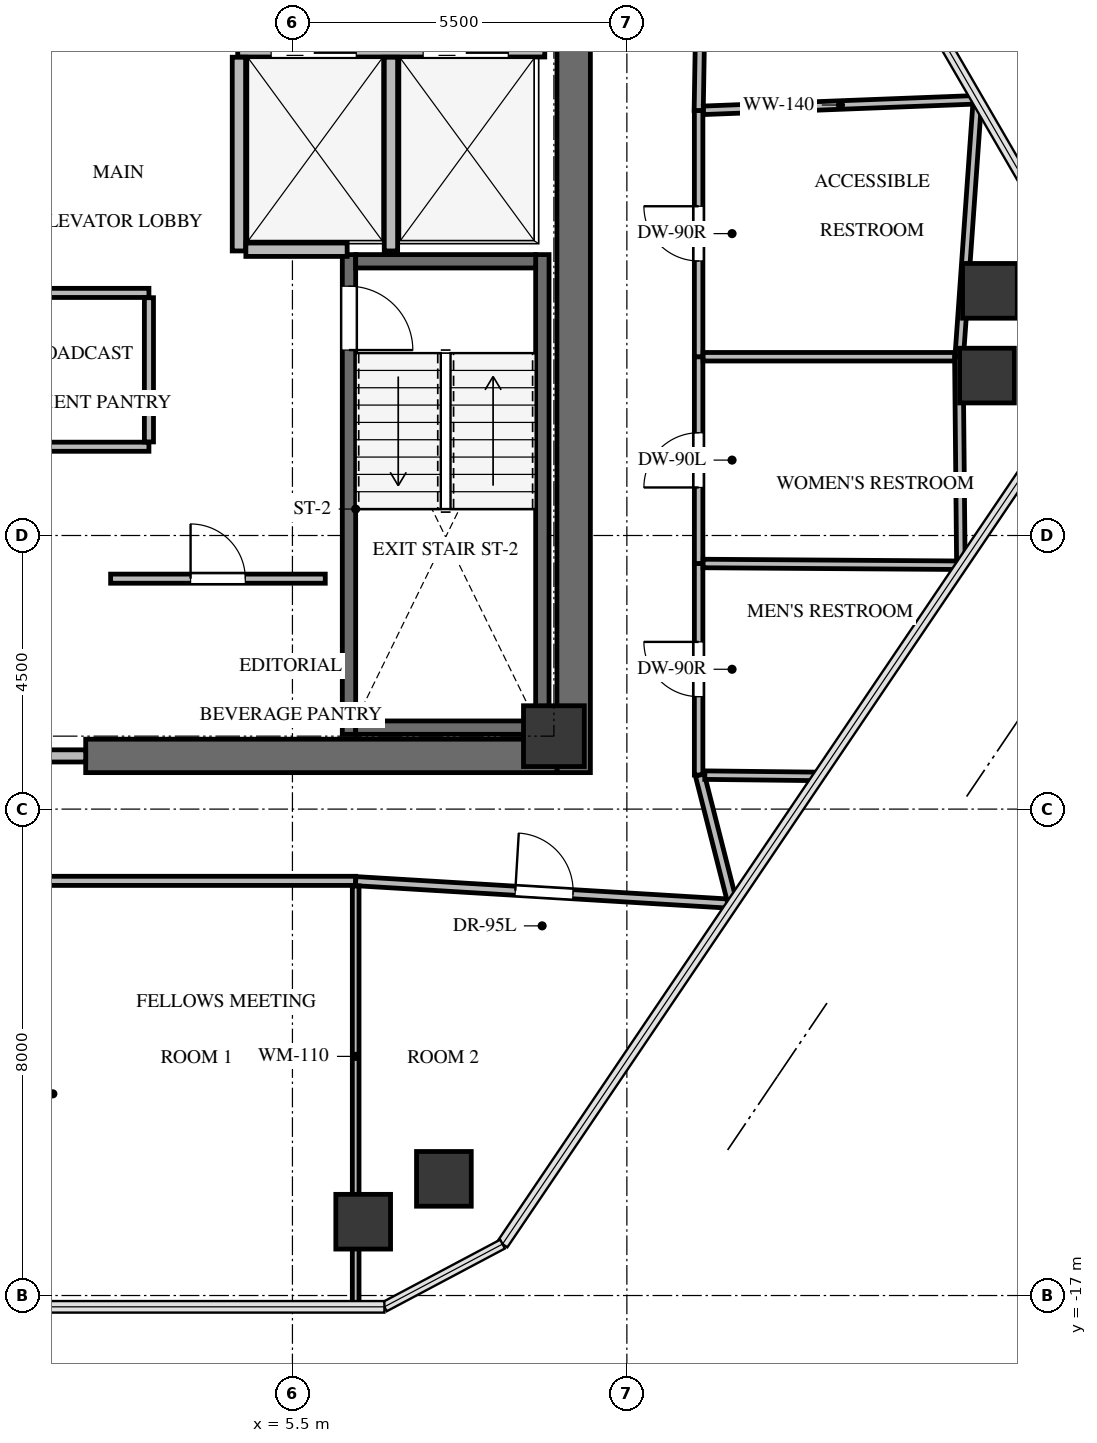
"""IFC4 building model, lengths in metres.
Left out: names, types, materials, properties, quantities, classifications, styles, units other than length and angle.
Written with IfcOpenShell. Run it as: python <this file> out.ifc"""

import sys

from ifc_helpers import new_model, si_unit, direction, frame, frame_2d, origin, origin_2d, place, context, subcontext, project, spatial, rectangle, extrude, source, transform, mapped, element, fill, save


model = new_model("IFC4")
c1 = context("Model", 3, precision=1e-05, world=origin(), true_north=direction((0.0, 1.0)))
c2 = subcontext(c1, "Body", "Model", "MODEL_VIEW")
j1 = project(units=[si_unit("LENGTHUNIT", "METRE"), si_unit("PLANEANGLEUNIT", "RADIAN")], contexts=[c1])
p1 = place(None, origin())
s1 = spatial("IfcSite", under=j1, at=p1, CompositionType="ELEMENT")
p2 = place(p1, origin())
s2 = spatial("IfcBuilding", under=s1, at=p2, CompositionType="ELEMENT")
p3 = place(p2, frame((0.0, 0.0, 251.3)))
s3 = spatial("IfcBuildingStorey", under=s2, at=p3, CompositionType="ELEMENT", Elevation=251.3)
p4 = place(p3, frame((10.125, -8.4, 0.0), z_axis=(0.0, 0.0, 1.0), x_axis=(0.0, 1.0, 0.0)))
e1 = element("IfcWall", 1, at=p4, inside=s3, PredefinedType="SHEAR", context=c2, shape_type="SweptSolid", body=[
    extrude(rectangle(XDim=16.8, YDim=0.55, at=frame_2d((8.4, 0.0))), origin(), (0.0, 0.0, 1.0), 3.4),
])
p5 = place(p3, frame((2.1, -8.125, 0.0), z_axis=(0.0, 0.0, 1.0), x_axis=(1.0, 0.0, 0.0)))
e2 = element("IfcWall", 2, at=p5, inside=s3, PredefinedType="SHEAR", context=c2, shape_type="SweptSolid", body=[
    extrude(rectangle(XDim=7.75, YDim=0.55, at=frame_2d((3.875, 0.0))), origin(), (0.0, 0.0, 1.0), 3.4),
])
p6 = place(p3, frame((9.61, -7.77, -0.24), z_axis=(0.0, 0.0, 1.0), x_axis=(0.0, 1.0, 0.0)))
e3 = element("IfcWall", 3, at=p6, inside=s3, PredefinedType="SHEAR", context=c2, shape_type="SweptSolid", body=[
    extrude(rectangle(XDim=7.89, YDim=0.22, at=frame_2d((3.945, 0.0))), origin(), (0.0, 0.0, 1.0), 3.4),
])
p7 = place(p3, frame((6.43, 0.12, -0.24), z_axis=(0.0, 0.0, 1.0), x_axis=(0.0, -1.0, 0.0)))
e4 = element("IfcWall", 4, at=p7, inside=s3, PredefinedType="SHEAR", context=c2, shape_type="SweptSolid", body=[
    extrude(rectangle(XDim=7.89, YDim=0.22, at=frame_2d((3.945, 0.0))), origin(), (0.0, 0.0, 1.0), 3.4),
])
p8 = place(p7, frame((0.52, 0.0, 0.0)))
e5 = element("IfcOpeningElement", 5, at=p8, cuts=e4, PredefinedType="OPENING", context=c2, shape_type="SweptSolid", body=[
    extrude(rectangle(XDim=1.05, YDim=2.15, at=frame_2d((0.525, 1.075))), frame((0.0, 0.12, 0.0), z_axis=(0.0, -1.0, 0.0), x_axis=(1.0, 0.0, 0.0)), (0.0, 0.0, 1.0), 0.24),
])
for number, where, z_axis, x_axis in (
    (6, (6.54, -7.66, -0.24), (0.0, 0.0, 1.0), (1.0, 0.0, 0.0)),
    (7, (9.5, 0.01, -0.24), (0.0, 0.0, 1.0), (-1.0, 0.0, 0.0)),
):
    element("IfcWall", number, at=place(p3, frame(where, z_axis=z_axis, x_axis=x_axis)), inside=s3, PredefinedType="SHEAR", context=c2, shape_type="SweptSolid", body=[
        extrude(rectangle(XDim=2.96, YDim=0.22, at=frame_2d((1.48, 0.0))), origin(), (0.0, 0.0, 1.0), 3.4),
    ])
m1 = source(origin(), c2, "Body", "SweptSolid", [
    extrude(rectangle(XDim=1.0, YDim=1.0, at=origin_2d()), origin(), (0.0, 0.0, 1.0), 3.4),
])
p9 = place(p3, frame((9.8, -7.8, -0.24), z_axis=(0.0, 0.0, 1.0), x_axis=(1.0, 0.0, 0.0)))
e8 = element("IfcColumn", 8, at=p9, inside=s3, PredefinedType="COLUMN", context=c2, shape_type="MappedRepresentation", body=[
    mapped(m1, transform((0.0, 0.0, 0.0), x_axis=(1.0, 0.0, 0.0), y_axis=(0.0, 1.0, 0.0), z_axis=(0.0, 0.0, 1.0), scale=1.0)),
])
m2 = source(origin(), c2, "Body", "SweptSolid", [
    extrude(rectangle(XDim=0.9, YDim=0.9, at=origin_2d()), origin(), (0.0, 0.0, 1.0), 3.4),
])
for number, where, z_axis, x_axis in (
    (9, (16.97, -0.476, -0.24), (0.0, 0.0, 1.0), (1.0, 0.0, 0.0)),
    (10, (16.922, -1.87, -0.24), (0.0, 0.0, 1.0), (1.0, 0.0, 0.0)),
    (11, (7.991, -15.081, -0.24), (0.0, 0.0, 1.0), (1.0, 0.0, 0.0)),
    (12, (6.664, -15.786, -0.24), (0.0, 0.0, 1.0), (1.0, 0.0, 0.0)),
):
    element("IfcColumn", number, at=place(p3, frame(where, z_axis=z_axis, x_axis=x_axis)), inside=s3, PredefinedType="COLUMN", context=c2, shape_type="MappedRepresentation", body=[
        mapped(m2, transform((0.0, 0.0, 0.0), x_axis=(1.0, 0.0, 0.0), y_axis=(0.0, 1.0, 0.0), z_axis=(0.0, 0.0, 1.0), scale=1.0)),
    ])
p10 = place(p3, frame((-2.1, -8.125, 0.0), z_axis=(0.0, 0.0, 1.0), x_axis=(1.0, 0.0, 0.0)))
e13 = element("IfcWall", 13, at=p10, inside=s3, PredefinedType="SOLIDWALL", context=c2, shape_type="SweptSolid", body=[
    extrude(rectangle(XDim=4.2, YDim=0.2, at=frame_2d((2.1, 0.0))), origin(), (0.0, 0.0, 1.0), 3.145),
])
p11 = place(p10, frame((1.2, 0.0, 0.0)))
e14 = element("IfcOpeningElement", 14, at=p11, cuts=e13, PredefinedType="OPENING", context=c2, shape_type="SweptSolid", body=[
    extrude(rectangle(XDim=1.8, YDim=2.15, at=frame_2d((0.9, 1.075))), frame((0.0, 0.11, 0.0), z_axis=(0.0, -1.0, 0.0), x_axis=(1.0, 0.0, 0.0)), (0.0, 0.0, 1.0), 0.22),
])
p12 = place(p3, frame((4.6, 3.48, 0.0), z_axis=(0.0, 0.0, 1.0), x_axis=(1.0, 0.0, 0.0)))
e15 = element("IfcWall", 15, at=p12, inside=s3, PredefinedType="SOLIDWALL", context=c2, shape_type="SweptSolid", body=[
    extrude(rectangle(XDim=5.05, YDim=0.22, at=frame_2d((2.525, 0.0))), origin(), (0.0, 0.0, 1.0), 3.145),
])
p13 = place(p12, frame((0.55, 0.0, 0.0)))
e16 = element("IfcOpeningElement", 16, at=p13, cuts=e15, PredefinedType="OPENING", context=c2, shape_type="SweptSolid", body=[
    extrude(rectangle(XDim=1.4, YDim=2.15, at=frame_2d((0.7, 1.075))), frame((0.0, 0.12, 0.0), z_axis=(0.0, -1.0, 0.0), x_axis=(1.0, 0.0, 0.0)), (0.0, 0.0, 1.0), 0.24),
])
p14 = place(p12, frame((3.05, 0.0, 0.0)))
e17 = element("IfcOpeningElement", 17, at=p14, cuts=e15, PredefinedType="OPENING", context=c2, shape_type="SweptSolid", body=[
    extrude(rectangle(XDim=1.4, YDim=2.15, at=frame_2d((0.7, 1.075))), frame((0.0, 0.12, 0.0), z_axis=(0.0, -1.0, 0.0), x_axis=(1.0, 0.0, 0.0)), (0.0, 0.0, 1.0), 0.24),
])
for number, where, z_axis, x_axis in (
    (18, (4.62, 0.18, 0.0), (0.0, 0.0, 1.0), (0.0, 1.0, 0.0)),
    (19, (7.12, 0.18, 0.0), (0.0, 0.0, 1.0), (0.0, 1.0, 0.0)),
):
    element("IfcWall", number, at=place(p3, frame(where, z_axis=z_axis, x_axis=x_axis)), inside=s3, PredefinedType="SOLIDWALL", context=c2, shape_type="SweptSolid", body=[
        extrude(rectangle(XDim=3.186, YDim=0.22, at=frame_2d((1.593, 0.0))), origin(), (0.0, 0.0, 1.0), 3.145),
    ])
p15 = place(p3, frame((4.734, 0.2, 0.0), z_axis=(0.0, 0.0, 1.0), x_axis=(1.0, 0.0, 0.0)))
e20 = element("IfcWall", 20, at=p15, inside=s3, PredefinedType="SOLIDWALL", context=c2, shape_type="SweptSolid", body=[
    extrude(rectangle(XDim=1.666, YDim=0.22, at=frame_2d((0.833, 0.0))), origin(), (0.0, 0.0, 1.0), 3.145),
])
p16 = place(p3, frame((2.51, -5.21, 0.0), z_axis=(0.0, 0.0, 1.0), x_axis=(1.0, 0.0, 0.0)))
e21 = element("IfcWall", 21, at=p16, inside=s3, PredefinedType="PARTITIONING", context=c2, shape_type="SweptSolid", body=[
    extrude(rectangle(XDim=3.53, YDim=0.15, at=frame_2d((1.765, 0.0))), origin(), (0.0, 0.0, 1.0), 3.145),
])
p17 = place(p16, frame((1.315, 0.0, 0.0)))
e22 = element("IfcOpeningElement", 22, at=p17, cuts=e21, PredefinedType="OPENING", context=c2, shape_type="SweptSolid", body=[
    extrude(rectangle(XDim=0.9, YDim=2.05, at=frame_2d((0.45, 1.025))), frame((0.0, 0.085, 0.0), z_axis=(0.0, -1.0, 0.0), x_axis=(1.0, 0.0, 0.0)), (0.0, 0.0, 1.0), 0.17),
])
p18 = place(p3, frame((3.14, -3.04, 0.0), z_axis=(0.0, 0.0, 1.0), x_axis=(-1.0, 0.0, 0.0)))
e23 = element("IfcWall", 23, at=p18, inside=s3, PredefinedType="PARTITIONING", context=c2, shape_type="SweptSolid", body=[
    extrude(rectangle(XDim=7.48, YDim=0.15, at=frame_2d((3.74, 0.0))), origin(), (0.0, 0.0, 1.0), 3.145),
])
p19 = place(p18, frame((3.29, 0.0, 0.0)))
e24 = element("IfcOpeningElement", 24, at=p19, cuts=e23, PredefinedType="OPENING", context=c2, shape_type="SweptSolid", body=[
    extrude(rectangle(XDim=0.9, YDim=2.05, at=frame_2d((0.45, 1.025))), frame((0.0, 0.085, 0.0), z_axis=(0.0, -1.0, 0.0), x_axis=(1.0, 0.0, 0.0)), (0.0, 0.0, 1.0), 0.17),
])
p20 = place(p3, frame((-4.34, -0.51, 0.0), z_axis=(0.0, 0.0, 1.0), x_axis=(1.0, 0.0, 0.0)))
e25 = element("IfcWall", 25, at=p20, inside=s3, PredefinedType="PARTITIONING", context=c2, shape_type="SweptSolid", body=[
    extrude(rectangle(XDim=7.48, YDim=0.15, at=frame_2d((3.74, 0.0))), origin(), (0.0, 0.0, 1.0), 3.145),
])
p21 = place(p3, frame((3.14, -0.589, 0.0), z_axis=(0.0, 0.0, 1.0), x_axis=(0.0, -1.0, 0.0)))
e26 = element("IfcWall", 26, at=p21, inside=s3, PredefinedType="PARTITIONING", context=c2, shape_type="SweptSolid", body=[
    extrude(rectangle(XDim=2.372, YDim=0.15, at=frame_2d((1.186, 0.0))), origin(), (0.0, 0.0, 1.0), 3.145),
])
p22 = place(p3, frame((12.18, -8.44, 0.0), z_axis=(0.0, 0.0, 1.0), x_axis=(0.0, 1.0, 0.0)))
e27 = element("IfcWall", 27, at=p22, inside=s3, PredefinedType="PARTITIONING", context=c2, shape_type="SweptSolid", body=[
    extrude(rectangle(XDim=3.48, YDim=0.14, at=frame_2d((1.74, 0.0))), origin(), (0.0, 0.0, 1.0), 2.499),
])
p23 = place(p22, frame((1.29, 0.0, 0.0)))
e28 = element("IfcOpeningElement", 28, at=p23, cuts=e27, PredefinedType="OPENING", context=c2, shape_type="SweptSolid", body=[
    extrude(rectangle(XDim=0.9, YDim=2.05, at=frame_2d((0.45, 1.025))), frame((0.0, 0.08, 0.0), z_axis=(0.0, -1.0, 0.0), x_axis=(1.0, 0.0, 0.0)), (0.0, 0.0, 1.0), 0.16),
])
p24 = place(p3, frame((12.18, -4.96, 0.0), z_axis=(0.0, 0.0, 1.0), x_axis=(0.0, 1.0, 0.0)))
e29 = element("IfcWall", 29, at=p24, inside=s3, PredefinedType="PARTITIONING", context=c2, shape_type="SweptSolid", body=[
    extrude(rectangle(XDim=3.4, YDim=0.14, at=frame_2d((1.7, 0.0))), origin(), (0.0, 0.0, 1.0), 3.145),
])
p25 = place(p24, frame((1.25, 0.0, 0.0)))
e30 = element("IfcOpeningElement", 30, at=p25, cuts=e29, PredefinedType="OPENING", context=c2, shape_type="SweptSolid", body=[
    extrude(rectangle(XDim=0.9, YDim=2.05, at=frame_2d((0.45, 1.025))), frame((0.0, 0.08, 0.0), z_axis=(0.0, -1.0, 0.0), x_axis=(1.0, 0.0, 0.0)), (0.0, 0.0, 1.0), 0.16),
])
p26 = place(p3, frame((12.18, -1.56, 0.0), z_axis=(0.0, 0.0, 1.0), x_axis=(0.0, 1.0, 0.0)))
e31 = element("IfcWall", 31, at=p26, inside=s3, PredefinedType="PARTITIONING", context=c2, shape_type="SweptSolid", body=[
    extrude(rectangle(XDim=4.05, YDim=0.14, at=frame_2d((2.025, 0.0))), origin(), (0.0, 0.0, 1.0), 2.401),
])
p27 = place(p26, frame((1.575, 0.0, 0.0)))
e32 = element("IfcOpeningElement", 32, at=p27, cuts=e31, PredefinedType="OPENING", context=c2, shape_type="SweptSolid", body=[
    extrude(rectangle(XDim=0.9, YDim=2.05, at=frame_2d((0.45, 1.025))), frame((0.0, 0.08, 0.0), z_axis=(0.0, -1.0, 0.0), x_axis=(1.0, 0.0, 0.0)), (0.0, 0.0, 1.0), 0.16),
])
p28 = place(p3, frame((1.089, -10.18, 0.0), z_axis=(0.0, 0.0, 1.0), x_axis=(1.0, 0.0, 0.0)))
e33 = element("IfcWall", 33, at=p28, inside=s3, PredefinedType="PARTITIONING", context=c2, shape_type="SweptSolid", body=[
    extrude(rectangle(XDim=5.451, YDim=0.15, at=frame_2d((2.726, 0.0))), origin(), (0.0, 0.0, 1.0), 2.401),
])
p29 = place(p3, frame((6.54, -10.185, 0.0), z_axis=(0.0, 0.0, 1.0), x_axis=(0.9981941592, -0.060070130174, 0.0)))
e34 = element("IfcWall", 34, at=p29, inside=s3, PredefinedType="PARTITIONING", context=c2, shape_type="SweptSolid", body=[
    extrude(rectangle(XDim=6.21, YDim=0.15, at=frame_2d((3.105, 0.0))), origin(), (0.0, 0.0, 1.0), 2.499),
])
p30 = place(p29, frame((2.63, 0.0, 0.0)))
e35 = element("IfcOpeningElement", 35, at=p30, cuts=e34, PredefinedType="OPENING", context=c2, shape_type="SweptSolid", body=[
    extrude(rectangle(XDim=0.95, YDim=2.1, at=frame_2d((0.475, 1.05))), frame((0.0, 0.085, 0.0), z_axis=(0.0, -1.0, 0.0), x_axis=(1.0, 0.0, 0.0)), (0.0, 0.0, 1.0), 0.17),
])
p31 = place(p3, frame((12.719, -10.477, 0.0), z_axis=(0.0, 0.0, 1.0), x_axis=(-0.246550381988, 0.96912997536, 0.0)))
e36 = element("IfcWall", 36, at=p31, inside=s3, PredefinedType="PARTITIONING", context=c2, shape_type="SweptSolid", body=[
    extrude(rectangle(XDim=2.102, YDim=0.15, at=frame_2d((1.051, 0.0))), origin(), (0.0, 0.0, 1.0), 2.499),
])
p32 = place(p3, frame((12.181, 2.49, 0.0), z_axis=(0.0, 0.0, 1.0), x_axis=(0.016828669653, 0.999858387912, 0.0)))
e37 = element("IfcWall", 37, at=p32, inside=s3, PredefinedType="PARTITIONING", context=c2, shape_type="SweptSolid", body=[
    extrude(rectangle(XDim=7.674, YDim=0.15, at=frame_2d((3.837, 0.0))), origin(), (0.0, 0.0, 1.0), 2.499),
])
p33 = place(p32, frame((3.377, 0.0, 0.0)))
e38 = element("IfcOpeningElement", 38, at=p33, cuts=e37, PredefinedType="OPENING", context=c2, shape_type="SweptSolid", body=[
    extrude(rectangle(XDim=0.92, YDim=2.1, at=frame_2d((0.46, 1.05))), frame((0.0, 0.085, 0.0), z_axis=(0.0, -1.0, 0.0), x_axis=(1.0, 0.0, 0.0)), (0.0, 0.0, 1.0), 0.17),
])
p34 = place(p3, frame((12.254, -4.96, 0.0), z_axis=(0.0, 0.0, 1.0), x_axis=(0.999976630429, -0.006836563198, 0.0)))
e39 = element("IfcWall", 39, at=p34, inside=s3, PredefinedType="PARTITIONING", context=c2, shape_type="SweptSolid", body=[
    extrude(rectangle(XDim=4.25, YDim=0.14, at=frame_2d((2.125, 0.0))), origin(), (0.0, 0.0, 1.0), 2.499),
])
p35 = place(p3, frame((14.156, -8.462, 0.0), z_axis=(0.0, 0.0, 1.0), x_axis=(-0.999935742613, 0.011336253532, 0.0)))
e40 = element("IfcWall", 40, at=p35, inside=s3, PredefinedType="PARTITIONING", context=c2, shape_type="SweptSolid", body=[
    extrude(rectangle(XDim=1.874, YDim=0.14, at=frame_2d((0.937, 0.0))), origin(), (0.0, 0.0, 1.0), 2.499),
])
p36 = place(p3, frame((12.254, -1.56, 0.0), z_axis=(0.0, 0.0, 1.0), x_axis=(1.0, 0.0, 0.0)))
e41 = element("IfcWall", 41, at=p36, inside=s3, PredefinedType="PARTITIONING", context=c2, shape_type="SweptSolid", body=[
    extrude(rectangle(XDim=4.206, YDim=0.14, at=frame_2d((2.103, 0.0))), origin(), (0.0, 0.0, 1.0), 2.401),
])
p37 = place(p3, frame((16.46, -1.56, 0.0), z_axis=(0.0, 0.0, 1.0), x_axis=(0.009604446748, -0.999953876238, 0.0)))
e42 = element("IfcWall", 42, at=p37, inside=s3, PredefinedType="PARTITIONING", context=c2, shape_type="SweptSolid", body=[
    extrude(rectangle(XDim=3.355, YDim=0.14, at=frame_2d((1.678, 0.0))), origin(), (0.0, 0.0, 1.0), 2.401),
])
p38 = place(p3, frame((12.26, 2.493, 0.0), z_axis=(0.0, 0.0, 1.0), x_axis=(0.999256206289, 0.038562082324, 0.0)))
e43 = element("IfcWall", 43, at=p38, inside=s3, PredefinedType="PARTITIONING", context=c2, shape_type="SweptSolid", body=[
    extrude(rectangle(XDim=4.508, YDim=0.14, at=frame_2d((2.254, 0.0))), origin(), (0.0, 0.0, 1.0), 2.499),
])
p39 = place(p3, frame((16.76, 2.593, 0.0), z_axis=(0.0, 0.0, 1.0), x_axis=(-0.07055102187, -0.997508172053, 0.0)))
e44 = element("IfcWall", 44, at=p39, inside=s3, PredefinedType="PARTITIONING", context=c2, shape_type="SweptSolid", body=[
    extrude(rectangle(XDim=4.163, YDim=0.14, at=frame_2d((2.082, 0.0))), origin(), (0.0, 0.0, 1.0), 2.401),
])
p40 = place(p3, frame((6.54, -10.264, 0.0), z_axis=(0.0, 0.0, 1.0), x_axis=(0.0, -1.0, 0.0)))
e45 = element("IfcWall", 45, at=p40, inside=s3, PredefinedType="MOVABLE", context=c2, shape_type="SweptSolid", body=[
    extrude(rectangle(XDim=5.606, YDim=0.11, at=frame_2d((2.803, 0.0))), origin(), (0.0, 0.0, 1.0), 2.401),
])
p41 = place(p3, frame((6.54, -15.87, 0.0), z_axis=(0.0, 0.0, 1.0), x_axis=(0.0, -1.0, 0.0)))
e46 = element("IfcWall", 46, at=p41, inside=s3, PredefinedType="MOVABLE", context=c2, shape_type="SweptSolid", body=[
    extrude(rectangle(XDim=1.316, YDim=0.11, at=frame_2d((0.658, 0.0))), origin(), (0.0, 0.0, 1.0), 1.977),
])
m3 = source(origin(), c2, "Body", "SweptSolid", [
    extrude(rectangle(XDim=1.05, YDim=2.15, at=frame_2d((0.525, 1.075))), frame((0.0, 0.025, 0.0), z_axis=(0.0, -1.0, 0.0), x_axis=(1.0, 0.0, 0.0)), (0.0, 0.0, 1.0), 0.05),
])
p42 = place(p8, origin())
e47 = element("IfcDoor", 47, at=p42, inside=s3, OperationType="SINGLE_SWING_RIGHT", PredefinedType="DOOR", context=c2, shape_type="MappedRepresentation", body=[
    mapped(m3, transform((0.0, 0.0, 0.0), x_axis=(1.0, 0.0, 0.0), y_axis=(0.0, 1.0, 0.0), z_axis=(0.0, 0.0, 1.0), scale=1.0)),
])
fill(e5, e47)
m4 = source(origin(), c2, "Body", "SweptSolid", [
    extrude(rectangle(XDim=0.9, YDim=2.05, at=frame_2d((0.45, 1.025))), frame((0.0, 0.025, 0.0), z_axis=(0.0, -1.0, 0.0), x_axis=(1.0, 0.0, 0.0)), (0.0, 0.0, 1.0), 0.05),
])
p43 = place(p17, origin())
e48 = element("IfcDoor", 48, at=p43, inside=s3, OperationType="SINGLE_SWING_LEFT", PredefinedType="DOOR", context=c2, shape_type="MappedRepresentation", body=[
    mapped(m4, transform((0.0, 0.0, 0.0), x_axis=(1.0, 0.0, 0.0), y_axis=(0.0, 1.0, 0.0), z_axis=(0.0, 0.0, 1.0), scale=1.0)),
])
fill(e22, e48)
m5 = source(origin(), c2, "Body", "SweptSolid", [
    extrude(rectangle(XDim=0.9, YDim=2.05, at=frame_2d((0.45, 1.025))), frame((0.0, 0.025, 0.0), z_axis=(0.0, -1.0, 0.0), x_axis=(1.0, 0.0, 0.0)), (0.0, 0.0, 1.0), 0.05),
])
p44 = place(p23, origin())
e49 = element("IfcDoor", 49, at=p44, inside=s3, OperationType="SINGLE_SWING_RIGHT", PredefinedType="DOOR", context=c2, shape_type="MappedRepresentation", body=[
    mapped(m5, transform((0.0, 0.0, 0.0), x_axis=(1.0, 0.0, 0.0), y_axis=(0.0, 1.0, 0.0), z_axis=(0.0, 0.0, 1.0), scale=1.0)),
])
fill(e28, e49)
m6 = source(origin(), c2, "Body", "SweptSolid", [
    extrude(rectangle(XDim=0.9, YDim=2.05, at=frame_2d((0.45, 1.025))), frame((0.0, 0.025, 0.0), z_axis=(0.0, -1.0, 0.0), x_axis=(1.0, 0.0, 0.0)), (0.0, 0.0, 1.0), 0.05),
])
p45 = place(p25, origin())
e50 = element("IfcDoor", 50, at=p45, inside=s3, OperationType="SINGLE_SWING_LEFT", PredefinedType="DOOR", context=c2, shape_type="MappedRepresentation", body=[
    mapped(m6, transform((0.0, 0.0, 0.0), x_axis=(1.0, 0.0, 0.0), y_axis=(0.0, 1.0, 0.0), z_axis=(0.0, 0.0, 1.0), scale=1.0)),
])
fill(e30, e50)
p46 = place(p27, origin())
e51 = element("IfcDoor", 51, at=p46, inside=s3, OperationType="SINGLE_SWING_RIGHT", PredefinedType="DOOR", context=c2, shape_type="MappedRepresentation", body=[
    mapped(m5, transform((0.0, 0.0, 0.0), x_axis=(1.0, 0.0, 0.0), y_axis=(0.0, 1.0, 0.0), z_axis=(0.0, 0.0, 1.0), scale=1.0)),
])
fill(e32, e51)
m7 = source(origin(), c2, "Body", "SweptSolid", [
    extrude(rectangle(XDim=0.95, YDim=2.1, at=frame_2d((0.475, 1.05))), frame((0.0, 0.025, 0.0), z_axis=(0.0, -1.0, 0.0), x_axis=(1.0, 0.0, 0.0)), (0.0, 0.0, 1.0), 0.05),
])
p47 = place(p30, origin())
e52 = element("IfcDoor", 52, at=p47, inside=s3, OperationType="SINGLE_SWING_LEFT", PredefinedType="DOOR", context=c2, shape_type="MappedRepresentation", body=[
    mapped(m7, transform((0.0, 0.0, 0.0), x_axis=(1.0, 0.0, 0.0), y_axis=(0.0, 1.0, 0.0), z_axis=(0.0, 0.0, 1.0), scale=1.0)),
])
fill(e35, e52)
save(model, sys.argv[1])
